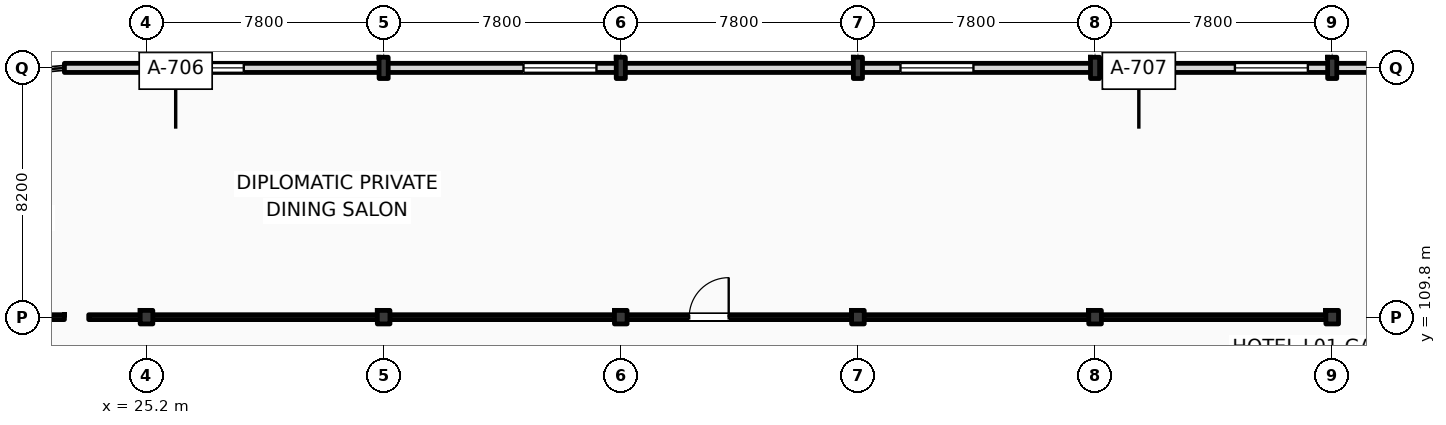
"""IFC4 building model, lengths in metres.
Left out: names, types, materials, properties, quantities, classifications, styles, units other than length and angle.
Written with IfcOpenShell. Run it as: python <this file> out.ifc"""

import sys

from ifc_helpers import new_model, si_unit, direction, frame, frame_2d, origin, origin_2d, place, context, subcontext, project, spatial, rectangle, i_section, extrude, element, fill, save


model = new_model("IFC4")
c1 = context("Model", 3, precision=1e-05, world=origin(), true_north=direction((0.0, 1.0)))
c2 = subcontext(c1, "Body", "Model", "MODEL_VIEW")
j1 = project(units=[si_unit("LENGTHUNIT", "METRE"), si_unit("PLANEANGLEUNIT", "RADIAN")], contexts=[c1])
p1 = place(None, origin())
s1 = spatial("IfcSite", under=j1, at=p1, CompositionType="ELEMENT")
p2 = place(p1, origin())
s2 = spatial("IfcBuilding", under=s1, at=p2, CompositionType="ELEMENT")
p3 = place(p2, frame((0.0, 0.0, 6.0)))
s3 = spatial("IfcBuildingStorey", under=s2, at=p3, CompositionType="ELEMENT", Elevation=6.0)
p4 = place(p3, frame((25.2, 109.8, 0.0), z_axis=(0.0, 0.0, 1.0), x_axis=(1.0, 0.0, 0.0)))
e1 = element("IfcColumn", 1, at=p4, inside=s3, PredefinedType="COLUMN", context=c2, shape_type="SweptSolid", body=[
    extrude(i_section(OverallWidth=0.416, OverallDepth=0.446, WebThickness=0.036, FlangeThickness=0.048, FilletRadius=0.015, at=origin_2d()), origin(), (0.0, 0.0, 1.0), 5.4),
])
p5 = place(p3, frame((25.2, 118.0, 0.0), z_axis=(0.0, 0.0, 1.0), x_axis=(1.0, 0.0, 0.0)))
e2 = element("IfcColumn", 2, at=p5, inside=s3, PredefinedType="COLUMN", context=c2, shape_type="SweptSolid", body=[
    extrude(i_section(OverallWidth=0.3, OverallDepth=0.7, WebThickness=0.017, FlangeThickness=0.032, FilletRadius=0.027, at=origin_2d()), origin(), (0.0, 0.0, 1.0), 5.4),
])
p6 = place(p3, frame((33.0, 109.8, 0.0), z_axis=(0.0, 0.0, 1.0), x_axis=(1.0, 0.0, 0.0)))
e3 = element("IfcColumn", 3, at=p6, inside=s3, PredefinedType="COLUMN", context=c2, shape_type="SweptSolid", body=[
    extrude(i_section(OverallWidth=0.416, OverallDepth=0.446, WebThickness=0.036, FlangeThickness=0.048, FilletRadius=0.015, at=origin_2d()), origin(), (0.0, 0.0, 1.0), 5.4),
])
p7 = place(p3, frame((33.0, 118.0, 0.0), z_axis=(0.0, 0.0, 1.0), x_axis=(1.0, 0.0, 0.0)))
e4 = element("IfcColumn", 4, at=p7, inside=s3, PredefinedType="COLUMN", context=c2, shape_type="SweptSolid", body=[
    extrude(i_section(OverallWidth=0.3, OverallDepth=0.7, WebThickness=0.017, FlangeThickness=0.032, FilletRadius=0.027, at=origin_2d()), origin(), (0.0, 0.0, 1.0), 5.4),
])
p8 = place(p3, frame((40.8, 109.8, 0.0), z_axis=(0.0, 0.0, 1.0), x_axis=(1.0, 0.0, 0.0)))
e5 = element("IfcColumn", 5, at=p8, inside=s3, PredefinedType="COLUMN", context=c2, shape_type="SweptSolid", body=[
    extrude(i_section(OverallWidth=0.416, OverallDepth=0.446, WebThickness=0.036, FlangeThickness=0.048, FilletRadius=0.015, at=origin_2d()), origin(), (0.0, 0.0, 1.0), 5.4),
])
p9 = place(p3, frame((40.8, 118.0, 0.0), z_axis=(0.0, 0.0, 1.0), x_axis=(1.0, 0.0, 0.0)))
e6 = element("IfcColumn", 6, at=p9, inside=s3, PredefinedType="COLUMN", context=c2, shape_type="SweptSolid", body=[
    extrude(i_section(OverallWidth=0.3, OverallDepth=0.7, WebThickness=0.017, FlangeThickness=0.032, FilletRadius=0.027, at=origin_2d()), origin(), (0.0, 0.0, 1.0), 5.4),
])
p10 = place(p3, frame((48.6, 109.8, 0.0), z_axis=(0.0, 0.0, 1.0), x_axis=(1.0, 0.0, 0.0)))
e7 = element("IfcColumn", 7, at=p10, inside=s3, PredefinedType="COLUMN", context=c2, shape_type="SweptSolid", body=[
    extrude(i_section(OverallWidth=0.416, OverallDepth=0.446, WebThickness=0.036, FlangeThickness=0.048, FilletRadius=0.015, at=origin_2d()), origin(), (0.0, 0.0, 1.0), 5.4),
])
p11 = place(p3, frame((48.6, 118.0, 0.0), z_axis=(0.0, 0.0, 1.0), x_axis=(1.0, 0.0, 0.0)))
e8 = element("IfcColumn", 8, at=p11, inside=s3, PredefinedType="COLUMN", context=c2, shape_type="SweptSolid", body=[
    extrude(i_section(OverallWidth=0.3, OverallDepth=0.7, WebThickness=0.017, FlangeThickness=0.032, FilletRadius=0.027, at=origin_2d()), origin(), (0.0, 0.0, 1.0), 5.4),
])
p12 = place(p3, frame((56.4, 109.8, 0.0), z_axis=(0.0, 0.0, 1.0), x_axis=(1.0, 0.0, 0.0)))
e9 = element("IfcColumn", 9, at=p12, inside=s3, PredefinedType="COLUMN", context=c2, shape_type="SweptSolid", body=[
    extrude(i_section(OverallWidth=0.416, OverallDepth=0.446, WebThickness=0.036, FlangeThickness=0.048, FilletRadius=0.015, at=origin_2d()), origin(), (0.0, 0.0, 1.0), 5.4),
])
p13 = place(p3, frame((56.4, 118.0, 0.0), z_axis=(0.0, 0.0, 1.0), x_axis=(1.0, 0.0, 0.0)))
e10 = element("IfcColumn", 10, at=p13, inside=s3, PredefinedType="COLUMN", context=c2, shape_type="SweptSolid", body=[
    extrude(i_section(OverallWidth=0.3, OverallDepth=0.7, WebThickness=0.017, FlangeThickness=0.032, FilletRadius=0.027, at=origin_2d()), origin(), (0.0, 0.0, 1.0), 5.4),
])
p14 = place(p3, frame((64.2, 109.8, 0.0), z_axis=(0.0, 0.0, 1.0), x_axis=(1.0, 0.0, 0.0)))
e11 = element("IfcColumn", 11, at=p14, inside=s3, PredefinedType="COLUMN", context=c2, shape_type="SweptSolid", body=[
    extrude(i_section(OverallWidth=0.416, OverallDepth=0.446, WebThickness=0.036, FlangeThickness=0.048, FilletRadius=0.015, at=origin_2d()), origin(), (0.0, 0.0, 1.0), 5.4),
])
p15 = place(p3, frame((64.2, 118.0, 0.0), z_axis=(0.0, 0.0, 1.0), x_axis=(1.0, 0.0, 0.0)))
e12 = element("IfcColumn", 12, at=p15, inside=s3, PredefinedType="COLUMN", context=c2, shape_type="SweptSolid", body=[
    extrude(i_section(OverallWidth=0.3, OverallDepth=0.7, WebThickness=0.017, FlangeThickness=0.032, FilletRadius=0.027, at=origin_2d()), origin(), (0.0, 0.0, 1.0), 5.4),
])
p16 = place(p3, frame((22.5, 118.0, 0.0), z_axis=(0.0, 0.0, 1.0), x_axis=(1.0, 0.0, 0.0)))
e13 = element("IfcWall", 13, at=p16, inside=s3, PredefinedType="STANDARD", context=c2, shape_type="SweptSolid", body=[
    extrude(rectangle(XDim=97.5, YDim=0.3, at=frame_2d((48.75, 0.0))), origin(), (0.0, 0.0, 1.0), 4.49),
])
p17 = place(p16, frame((3.5, 0.0, 0.95)))
e14 = element("IfcOpeningElement", 14, at=p17, cuts=e13, PredefinedType="OPENING", context=c2, shape_type="SweptSolid", body=[
    extrude(rectangle(XDim=2.4, YDim=2.4, at=frame_2d((1.2, 1.2))), frame((0.0, 0.16, 0.0), z_axis=(0.0, -1.0, 0.0), x_axis=(1.0, 0.0, 0.0)), (0.0, 0.0, 1.0), 0.32),
])
p18 = place(p16, frame((15.1, 0.0, 0.95)))
e15 = element("IfcOpeningElement", 15, at=p18, cuts=e13, PredefinedType="OPENING", context=c2, shape_type="SweptSolid", body=[
    extrude(rectangle(XDim=2.4, YDim=2.4, at=frame_2d((1.2, 1.2))), frame((0.0, 0.16, 0.0), z_axis=(0.0, -1.0, 0.0), x_axis=(1.0, 0.0, 0.0)), (0.0, 0.0, 1.0), 0.32),
])
p19 = place(p16, frame((27.5, 0.0, 0.95)))
e16 = element("IfcOpeningElement", 16, at=p19, cuts=e13, PredefinedType="OPENING", context=c2, shape_type="SweptSolid", body=[
    extrude(rectangle(XDim=2.4, YDim=2.4, at=frame_2d((1.2, 1.2))), frame((0.0, 0.16, 0.0), z_axis=(0.0, -1.0, 0.0), x_axis=(1.0, 0.0, 0.0)), (0.0, 0.0, 1.0), 0.32),
])
p20 = place(p16, frame((38.5, 0.0, 0.95)))
e17 = element("IfcOpeningElement", 17, at=p20, cuts=e13, PredefinedType="OPENING", context=c2, shape_type="SweptSolid", body=[
    extrude(rectangle(XDim=2.4, YDim=2.4, at=frame_2d((1.2, 1.2))), frame((0.0, 0.16, 0.0), z_axis=(0.0, -1.0, 0.0), x_axis=(1.0, 0.0, 0.0)), (0.0, 0.0, 1.0), 0.32),
])
p21 = place(p16, frame((51.5, 0.0, 0.95)))
e18 = element("IfcOpeningElement", 18, at=p21, cuts=e13, PredefinedType="OPENING", context=c2, shape_type="SweptSolid", body=[
    extrude(rectangle(XDim=2.4, YDim=2.4, at=frame_2d((1.2, 1.2))), frame((0.0, 0.16, 0.0), z_axis=(0.0, -1.0, 0.0), x_axis=(1.0, 0.0, 0.0)), (0.0, 0.0, 1.0), 0.32),
])
p22 = place(p16, frame((61.9, 0.0, 0.95)))
e19 = element("IfcOpeningElement", 19, at=p22, cuts=e13, PredefinedType="OPENING", context=c2, shape_type="SweptSolid", body=[
    extrude(rectangle(XDim=2.4, YDim=2.4, at=frame_2d((1.2, 1.2))), frame((0.0, 0.16, 0.0), z_axis=(0.0, -1.0, 0.0), x_axis=(1.0, 0.0, 0.0)), (0.0, 0.0, 1.0), 0.32),
])
p23 = place(p16, frame((75.5, 0.0, 0.95)))
e20 = element("IfcOpeningElement", 20, at=p23, cuts=e13, PredefinedType="OPENING", context=c2, shape_type="SweptSolid", body=[
    extrude(rectangle(XDim=2.4, YDim=2.4, at=frame_2d((1.2, 1.2))), frame((0.0, 0.16, 0.0), z_axis=(0.0, -1.0, 0.0), x_axis=(1.0, 0.0, 0.0)), (0.0, 0.0, 1.0), 0.32),
])
p24 = place(p16, frame((85.9, 0.0, 0.95)))
e21 = element("IfcOpeningElement", 21, at=p24, cuts=e13, PredefinedType="OPENING", context=c2, shape_type="SweptSolid", body=[
    extrude(rectangle(XDim=2.4, YDim=2.4, at=frame_2d((1.2, 1.2))), frame((0.0, 0.16, 0.0), z_axis=(0.0, -1.0, 0.0), x_axis=(1.0, 0.0, 0.0)), (0.0, 0.0, 1.0), 0.32),
])
p25 = place(p3, frame((23.3, 109.8, 0.0), z_axis=(0.0, 0.0, 1.0), x_axis=(1.0, 0.0, 0.0)))
e22 = element("IfcWall", 22, at=p25, inside=s3, PredefinedType="PARTITIONING", context=c2, shape_type="SweptSolid", body=[
    extrude(rectangle(XDim=40.8, YDim=0.16, at=frame_2d((20.4, 0.0))), origin(), (0.0, 0.0, 1.0), 2.84),
])
p26 = place(p25, frame((19.75, 0.0, 0.0)))
e23 = element("IfcOpeningElement", 23, at=p26, cuts=e22, PredefinedType="OPENING", context=c2, shape_type="SweptSolid", body=[
    extrude(rectangle(XDim=1.3, YDim=2.2, at=frame_2d((0.65, 1.1))), frame((0.0, 0.09, 0.0), z_axis=(0.0, -1.0, 0.0), x_axis=(1.0, 0.0, 0.0)), (0.0, 0.0, 1.0), 0.18),
])
p27 = place(p3, frame((9.1, 109.8, 0.0), z_axis=(0.0, 0.0, 1.0), x_axis=(1.0, 0.0, 0.0)))
e24 = element("IfcWall", 24, at=p27, inside=s3, PredefinedType="PARTITIONING", context=c2, shape_type="SweptSolid", body=[
    extrude(rectangle(XDim=13.4, YDim=0.16, at=frame_2d((6.7, 0.0))), origin(), (0.0, 0.0, 1.0), 2.84),
])
p28 = place(p27, frame((5.05, 0.0, 0.0)))
e25 = element("IfcOpeningElement", 25, at=p28, cuts=e24, PredefinedType="OPENING", context=c2, shape_type="SweptSolid", body=[
    extrude(rectangle(XDim=1.3, YDim=2.2, at=frame_2d((0.65, 1.1))), frame((0.0, 0.09, 0.0), z_axis=(0.0, -1.0, 0.0), x_axis=(1.0, 0.0, 0.0)), (0.0, 0.0, 1.0), 0.18),
])
p29 = place(p17, origin())
e26 = element("IfcWindow", 26, at=p29, inside=s3, PartitioningType="DOUBLE_PANEL_VERTICAL", PredefinedType="WINDOW", context=c2, shape_type="SweptSolid", body=[
    extrude(rectangle(XDim=2.4, YDim=2.4, at=frame_2d((1.2, 1.2))), frame((0.0, 0.03, 0.0), z_axis=(0.0, -1.0, 0.0), x_axis=(1.0, 0.0, 0.0)), (0.0, 0.0, 1.0), 0.06),
])
fill(e14, e26)
p30 = place(p18, origin())
e27 = element("IfcWindow", 27, at=p30, inside=s3, PartitioningType="DOUBLE_PANEL_VERTICAL", PredefinedType="WINDOW", context=c2, shape_type="SweptSolid", body=[
    extrude(rectangle(XDim=2.4, YDim=2.4, at=frame_2d((1.2, 1.2))), frame((0.0, 0.03, 0.0), z_axis=(0.0, -1.0, 0.0), x_axis=(1.0, 0.0, 0.0)), (0.0, 0.0, 1.0), 0.06),
])
fill(e15, e27)
p31 = place(p19, origin())
e28 = element("IfcWindow", 28, at=p31, inside=s3, PartitioningType="DOUBLE_PANEL_VERTICAL", PredefinedType="WINDOW", context=c2, shape_type="SweptSolid", body=[
    extrude(rectangle(XDim=2.4, YDim=2.4, at=frame_2d((1.2, 1.2))), frame((0.0, 0.03, 0.0), z_axis=(0.0, -1.0, 0.0), x_axis=(1.0, 0.0, 0.0)), (0.0, 0.0, 1.0), 0.06),
])
fill(e16, e28)
p32 = place(p20, origin())
e29 = element("IfcWindow", 29, at=p32, inside=s3, PartitioningType="DOUBLE_PANEL_VERTICAL", PredefinedType="WINDOW", context=c2, shape_type="SweptSolid", body=[
    extrude(rectangle(XDim=2.4, YDim=2.4, at=frame_2d((1.2, 1.2))), frame((0.0, 0.03, 0.0), z_axis=(0.0, -1.0, 0.0), x_axis=(1.0, 0.0, 0.0)), (0.0, 0.0, 1.0), 0.06),
])
fill(e17, e29)
p33 = place(p26, origin())
e30 = element("IfcDoor", 30, at=p33, inside=s3, OperationType="SINGLE_SWING_RIGHT", PredefinedType="DOOR", context=c2, shape_type="SweptSolid", body=[
    extrude(rectangle(XDim=1.3, YDim=2.2, at=frame_2d((0.65, 1.1))), frame((0.0, 0.025, 0.0), z_axis=(0.0, -1.0, 0.0), x_axis=(1.0, 0.0, 0.0)), (0.0, 0.0, 1.0), 0.05),
])
fill(e23, e30)
save(model, sys.argv[1])
